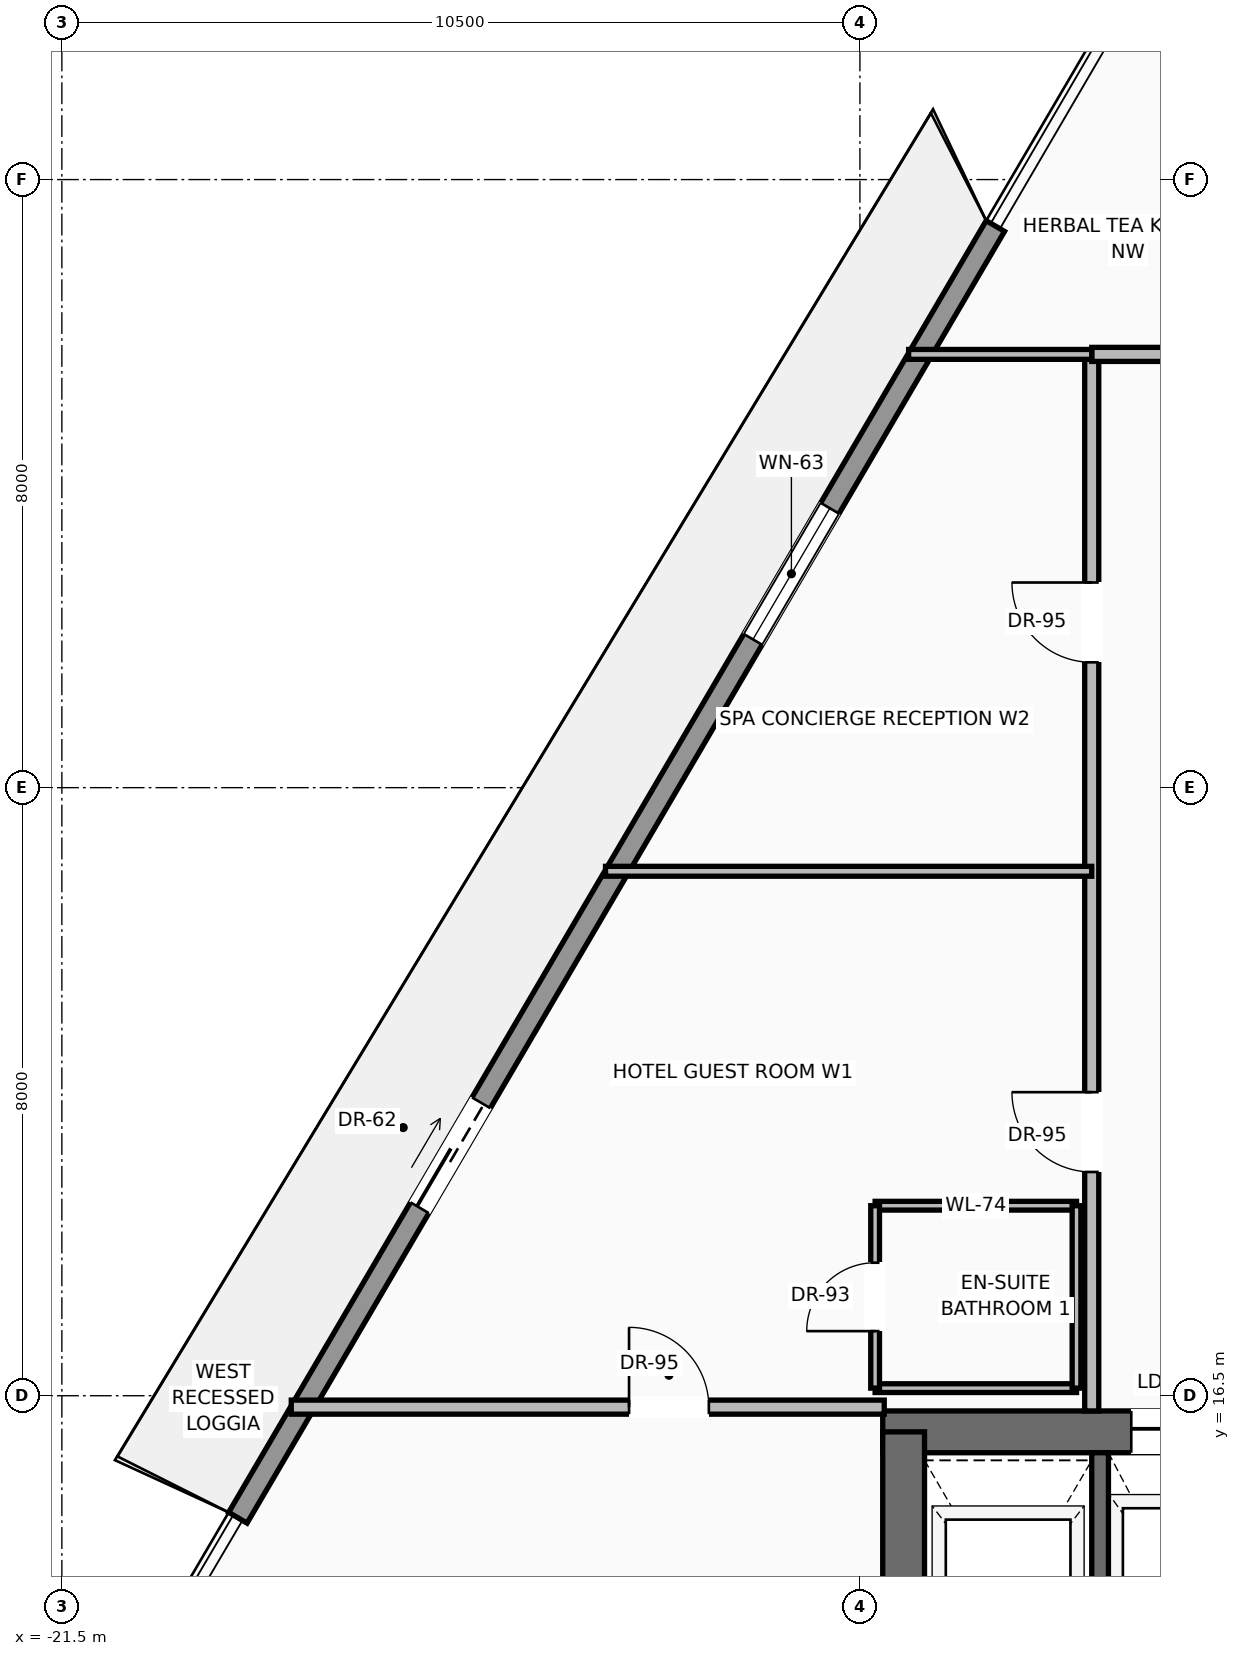
"""IFC4 building model, lengths in metres.
Left out: names, types, materials, properties, quantities, classifications, styles, units other than length and angle.
Written with IfcOpenShell. Run it as: python <this file> out.ifc"""

import sys

from ifc_helpers import new_model, si_unit, direction, frame, frame_2d, origin, place, context, subcontext, project, spatial, rectangle, extrude, source, transform, mapped, element, fill, save


model = new_model("IFC4")
c1 = context("Model", 3, precision=1e-05, world=origin(), true_north=direction((0.0, 1.0)))
c2 = subcontext(c1, "Body", "Model", "MODEL_VIEW")
j1 = project(units=[si_unit("LENGTHUNIT", "METRE"), si_unit("PLANEANGLEUNIT", "RADIAN")], contexts=[c1])
p1 = place(None, origin())
s1 = spatial("IfcSite", under=j1, at=p1, CompositionType="ELEMENT")
p2 = place(p1, origin())
s2 = spatial("IfcBuilding", under=s1, at=p2, CompositionType="ELEMENT")
p3 = place(p2, frame((0.0, 0.0, 247.6)))
s3 = spatial("IfcBuildingStorey", under=s2, at=p3, CompositionType="ELEMENT", Elevation=247.6)
p4 = place(p3, frame((-10.7, 16.025, 0.0), z_axis=(0.0, 0.0, 1.0), x_axis=(1.0, 0.0, 0.0)))
e1 = element("IfcWall", 1, at=p4, inside=s3, PredefinedType="SHEAR", context=c2, shape_type="SweptSolid", body=[
    extrude(rectangle(XDim=21.4, YDim=0.55, at=frame_2d((10.7, 0.0))), origin(), (0.0, 0.0, 1.0), 3.24),
])
p5 = place(p4, frame((3.27, 0.0, 0.0)))
e2 = element("IfcOpeningElement", 2, at=p5, cuts=e1, PredefinedType="OPENING", context=c2, shape_type="SweptSolid", body=[
    extrude(rectangle(XDim=1.3, YDim=2.3, at=frame_2d((0.65, 1.15))), frame((0.0, 0.285, 0.0), z_axis=(0.0, -1.0, 0.0), x_axis=(1.0, 0.0, 0.0)), (0.0, 0.0, 1.0), 0.57),
])
p6 = place(p4, frame((9.7, 0.0, 0.0)))
e3 = element("IfcOpeningElement", 3, at=p6, cuts=e1, PredefinedType="OPENING", context=c2, shape_type="SweptSolid", body=[
    extrude(rectangle(XDim=2.0, YDim=2.4, at=frame_2d((1.0, 1.2))), frame((0.0, 0.285, 0.0), z_axis=(0.0, -1.0, 0.0), x_axis=(1.0, 0.0, 0.0)), (0.0, 0.0, 1.0), 0.57),
])
p7 = place(p3, frame((-10.425, 0.575, 0.0), z_axis=(0.0, 0.0, 1.0), x_axis=(0.0, 1.0, 0.0)))
e4 = element("IfcWall", 4, at=p7, inside=s3, PredefinedType="SHEAR", context=c2, shape_type="SweptSolid", body=[
    extrude(rectangle(XDim=15.45, YDim=0.55, at=frame_2d((7.725, 0.0))), origin(), (0.0, 0.0, 1.0), 3.24),
])
p8 = place(p3, frame((-19.184, 14.895, 0.0), z_axis=(0.0, 0.0, 1.0), x_axis=(0.505884551296, 0.862601194504, 0.0)))
e5 = element("IfcWall", 5, at=p8, inside=s3, PredefinedType="SOLIDWALL", context=c2, shape_type="SweptSolid", body=[
    extrude(rectangle(XDim=19.701, YDim=0.28, at=frame_2d((9.85, 0.0))), origin(), (0.0, 0.0, 1.0), 2.82),
])
p9 = place(p8, frame((4.728, 0.0, 0.0)))
e6 = element("IfcOpeningElement", 6, at=p9, cuts=e5, PredefinedType="OPENING", context=c2, shape_type="SweptSolid", body=[
    extrude(rectangle(XDim=1.6, YDim=2.35, at=frame_2d((0.8, 1.175))), frame((0.0, 0.15, 0.0), z_axis=(0.0, -1.0, 0.0), x_axis=(1.0, 0.0, 0.0)), (0.0, 0.0, 1.0), 0.3),
])
p10 = place(p8, frame((13.396, 0.0, 0.9)))
e7 = element("IfcOpeningElement", 7, at=p10, cuts=e5, PredefinedType="OPENING", context=c2, shape_type="SweptSolid", body=[
    extrude(rectangle(XDim=2.0, YDim=1.75, at=frame_2d((1.0, 0.875))), frame((0.0, 0.15, 0.0), z_axis=(0.0, -1.0, 0.0), x_axis=(1.0, 0.0, 0.0)), (0.0, 0.0, 1.0), 0.3),
])
p11 = place(p3, frame((-7.84, 11.87, 0.0), z_axis=(0.0, 0.0, 1.0), x_axis=(0.0, 1.0, 0.0)))
e8 = element("IfcWall", 8, at=p11, inside=s3, PredefinedType="SOLIDWALL", context=c2, shape_type="SweptSolid", body=[
    extrude(rectangle(XDim=3.88, YDim=0.22, at=frame_2d((1.94, 0.0))), origin(), (0.0, 0.0, 1.0), 3.24),
])
p12 = place(p3, frame((-7.95, 16.3, 0.0), z_axis=(0.0, 0.0, 1.0), x_axis=(0.0, 1.0, 0.0)))
e9 = element("IfcWall", 9, at=p12, inside=s3, PredefinedType="PARTITIONING", context=c2, shape_type="SweptSolid", body=[
    extrude(rectangle(XDim=13.9, YDim=0.185, at=frame_2d((6.95, 0.0))), origin(), (0.0, 0.0, 1.0), 3.232),
])
p13 = place(p12, frame((3.144, 0.0, 0.0)))
e10 = element("IfcOpeningElement", 10, at=p13, cuts=e9, PredefinedType="OPENING", context=c2, shape_type="SweptSolid", body=[
    extrude(rectangle(XDim=1.05, YDim=2.25, at=frame_2d((0.525, 1.125))), frame((0.0, 0.103, 0.0), z_axis=(0.0, -1.0, 0.0), x_axis=(1.0, 0.0, 0.0)), (0.0, 0.0, 1.0), 0.205),
])
p14 = place(p12, frame((9.849, 0.0, 0.0)))
e11 = element("IfcOpeningElement", 11, at=p14, cuts=e9, PredefinedType="OPENING", context=c2, shape_type="SweptSolid", body=[
    extrude(rectangle(XDim=1.05, YDim=2.25, at=frame_2d((0.525, 1.125))), frame((0.0, 0.103, 0.0), z_axis=(0.0, -1.0, 0.0), x_axis=(1.0, 0.0, 0.0)), (0.0, 0.0, 1.0), 0.205),
])
p15 = place(p3, frame((-7.95, 30.2, 0.0), z_axis=(0.0, 0.0, 1.0), x_axis=(1.0, 0.0, 0.0)))
e12 = element("IfcWall", 12, at=p15, inside=s3, PredefinedType="PARTITIONING", context=c2, shape_type="SweptSolid", body=[
    extrude(rectangle(XDim=16.6, YDim=0.185, at=frame_2d((8.3, 0.0))), origin(), (0.0, 0.0, 1.0), 3.232),
])
p16 = place(p15, frame((3.25, 0.0, 0.0)))
e13 = element("IfcOpeningElement", 13, at=p16, cuts=e12, PredefinedType="OPENING", context=c2, shape_type="SweptSolid", body=[
    extrude(rectangle(XDim=1.05, YDim=2.25, at=frame_2d((0.525, 1.125))), frame((0.0, 0.103, 0.0), z_axis=(0.0, -1.0, 0.0), x_axis=(1.0, 0.0, 0.0)), (0.0, 0.0, 1.0), 0.205),
])
p17 = place(p15, frame((7.775, 0.0, 0.0)))
e14 = element("IfcOpeningElement", 14, at=p17, cuts=e12, PredefinedType="OPENING", context=c2, shape_type="SweptSolid", body=[
    extrude(rectangle(XDim=1.05, YDim=2.25, at=frame_2d((0.525, 1.125))), frame((0.0, 0.103, 0.0), z_axis=(0.0, -1.0, 0.0), x_axis=(1.0, 0.0, 0.0)), (0.0, 0.0, 1.0), 0.205),
])
p18 = place(p15, frame((11.6, 0.0, 0.0)))
e15 = element("IfcOpeningElement", 15, at=p18, cuts=e12, PredefinedType="OPENING", context=c2, shape_type="SweptSolid", body=[
    extrude(rectangle(XDim=1.05, YDim=2.25, at=frame_2d((0.525, 1.125))), frame((0.0, 0.103, 0.0), z_axis=(0.0, -1.0, 0.0), x_axis=(1.0, 0.0, 0.0)), (0.0, 0.0, 1.0), 0.205),
])
p19 = place(p3, frame((-18.482, 16.35, 0.0), z_axis=(0.0, 0.0, 1.0), x_axis=(1.0, 0.0, 0.0)))
e16 = element("IfcWall", 16, at=p19, inside=s3, PredefinedType="PARTITIONING", context=c2, shape_type="SweptSolid", body=[
    extrude(rectangle(XDim=7.802, YDim=0.185, at=frame_2d((3.901, 0.0))), origin(), (0.0, 0.0, 1.0), 3.232),
])
p20 = place(p19, frame((4.444, 0.0, 0.0)))
e17 = element("IfcOpeningElement", 17, at=p20, cuts=e16, PredefinedType="OPENING", context=c2, shape_type="SweptSolid", body=[
    extrude(rectangle(XDim=1.05, YDim=2.25, at=frame_2d((0.525, 1.125))), frame((0.0, 0.103, 0.0), z_axis=(0.0, -1.0, 0.0), x_axis=(1.0, 0.0, 0.0)), (0.0, 0.0, 1.0), 0.205),
])
p21 = place(p3, frame((-10.359, 30.2, 0.0), z_axis=(0.0, 0.0, 1.0), x_axis=(1.0, 0.0, 0.0)))
e18 = element("IfcWall", 18, at=p21, inside=s3, PredefinedType="PARTITIONING", context=c2, shape_type="SweptSolid", body=[
    extrude(rectangle(XDim=2.409, YDim=0.13, at=frame_2d((1.205, 0.0))), origin(), (0.0, 0.0, 1.0), 3.232),
])
for number, where, z_axis, x_axis in (
    (19, (-10.8, 16.6, 0.0), (0.0, 0.0, 1.0), (1.0, 0.0, 0.0)),
    (20, (-10.8, 19.0, 0.0), (0.0, 0.0, 1.0), (1.0, 0.0, 0.0)),
):
    element("IfcWall", number, at=place(p3, frame(where, z_axis=z_axis, x_axis=x_axis)), inside=s3, PredefinedType="PARTITIONING", context=c2, shape_type="SweptSolid", body=[
        extrude(rectangle(XDim=2.65, YDim=0.115, at=frame_2d((1.325, 0.0))), origin(), (0.0, 0.0, 1.0), 3.232),
    ])
p22 = place(p3, frame((-10.8, 16.6, 0.0), z_axis=(0.0, 0.0, 1.0), x_axis=(0.0, 1.0, 0.0)))
e21 = element("IfcWall", 21, at=p22, inside=s3, PredefinedType="PARTITIONING", context=c2, shape_type="SweptSolid", body=[
    extrude(rectangle(XDim=2.4, YDim=0.115, at=frame_2d((1.2, 0.0))), origin(), (0.0, 0.0, 1.0), 3.232),
])
p23 = place(p22, frame((0.75, 0.0, 0.0)))
e22 = element("IfcOpeningElement", 22, at=p23, cuts=e21, PredefinedType="OPENING", context=c2, shape_type="SweptSolid", body=[
    extrude(rectangle(XDim=0.9, YDim=2.15, at=frame_2d((0.45, 1.075))), frame((0.0, 0.067, 0.0), z_axis=(0.0, -1.0, 0.0), x_axis=(1.0, 0.0, 0.0)), (0.0, 0.0, 1.0), 0.135),
])
p24 = place(p3, frame((-8.15, 16.6, 0.0), z_axis=(0.0, 0.0, 1.0), x_axis=(0.0, 1.0, 0.0)))
e23 = element("IfcWall", 23, at=p24, inside=s3, PredefinedType="PARTITIONING", context=c2, shape_type="SweptSolid", body=[
    extrude(rectangle(XDim=2.4, YDim=0.115, at=frame_2d((1.2, 0.0))), origin(), (0.0, 0.0, 1.0), 3.232),
])
p25 = place(p3, frame((-14.347, 23.4, 0.0), z_axis=(0.0, 0.0, 1.0), x_axis=(1.0, 0.0, 0.0)))
e24 = element("IfcWall", 24, at=p25, inside=s3, PredefinedType="PARTITIONING", context=c2, shape_type="SweptSolid", body=[
    extrude(rectangle(XDim=6.397, YDim=0.13, at=frame_2d((3.199, 0.0))), origin(), (0.0, 0.0, 1.0), 3.232),
])
m1 = source(origin(), c2, "Body", "SweptSolid", [
    extrude(rectangle(XDim=1.6, YDim=2.35, at=frame_2d((0.8, 1.175))), frame((0.0, 0.025, 0.0), z_axis=(0.0, -1.0, 0.0), x_axis=(1.0, 0.0, 0.0)), (0.0, 0.0, 1.0), 0.05),
])
p26 = place(p9, origin())
e25 = element("IfcDoor", 25, at=p26, inside=s3, OperationType="SLIDING_TO_LEFT", PredefinedType="DOOR", context=c2, shape_type="MappedRepresentation", body=[
    mapped(m1, transform((0.0, 0.0, 0.0), scale=1.0)),
])
fill(e6, e25)
m2 = source(origin(), c2, "Body", "SweptSolid", [
    extrude(rectangle(XDim=2.0, YDim=1.75, at=frame_2d((1.0, 0.875))), frame((0.0, 0.03, 0.0), z_axis=(0.0, -1.0, 0.0), x_axis=(1.0, 0.0, 0.0)), (0.0, 0.0, 1.0), 0.06),
])
p27 = place(p10, origin())
e26 = element("IfcWindow", 26, at=p27, inside=s3, PartitioningType="SINGLE_PANEL", PredefinedType="WINDOW", context=c2, shape_type="MappedRepresentation", body=[
    mapped(m2, transform((0.0, 0.0, 0.0), scale=1.0)),
])
fill(e7, e26)
m3 = source(origin(), c2, "Body", "SweptSolid", [
    extrude(rectangle(XDim=1.3, YDim=2.3, at=frame_2d((0.65, 1.15))), frame((0.0, 0.025, 0.0), z_axis=(0.0, -1.0, 0.0), x_axis=(1.0, 0.0, 0.0)), (0.0, 0.0, 1.0), 0.05),
])
p28 = place(p5, origin())
e27 = element("IfcDoor", 27, at=p28, inside=s3, OperationType="SLIDING_TO_RIGHT", PredefinedType="DOOR", context=c2, shape_type="MappedRepresentation", body=[
    mapped(m3, transform((0.0, 0.0, 0.0), scale=1.0)),
])
fill(e2, e27)
m4 = source(origin(), c2, "Body", "SweptSolid", [
    extrude(rectangle(XDim=1.05, YDim=2.25, at=frame_2d((0.525, 1.125))), frame((0.0, 0.025, 0.0), z_axis=(0.0, -1.0, 0.0), x_axis=(1.0, 0.0, 0.0)), (0.0, 0.0, 1.0), 0.05),
])
p29 = place(p20, origin())
e28 = element("IfcDoor", 28, at=p29, inside=s3, OperationType="SINGLE_SWING_LEFT", PredefinedType="DOOR", context=c2, shape_type="MappedRepresentation", body=[
    mapped(m4, transform((0.0, 0.0, 0.0), scale=1.0)),
])
fill(e17, e28)
p30 = place(p13, origin())
e29 = element("IfcDoor", 29, at=p30, inside=s3, OperationType="SINGLE_SWING_RIGHT", PredefinedType="DOOR", context=c2, shape_type="MappedRepresentation", body=[
    mapped(m4, transform((0.0, 0.0, 0.0), scale=1.0)),
])
fill(e10, e29)
m5 = source(origin(), c2, "Body", "SweptSolid", [
    extrude(rectangle(XDim=0.9, YDim=2.15, at=frame_2d((0.45, 1.075))), frame((0.0, 0.025, 0.0), z_axis=(0.0, -1.0, 0.0), x_axis=(1.0, 0.0, 0.0)), (0.0, 0.0, 1.0), 0.05),
])
p31 = place(p23, origin())
e30 = element("IfcDoor", 30, at=p31, inside=s3, OperationType="SINGLE_SWING_LEFT", PredefinedType="DOOR", context=c2, shape_type="MappedRepresentation", body=[
    mapped(m5, transform((0.0, 0.0, 0.0), scale=1.0)),
])
fill(e22, e30)
p32 = place(p14, origin())
e31 = element("IfcDoor", 31, at=p32, inside=s3, OperationType="SINGLE_SWING_RIGHT", PredefinedType="DOOR", context=c2, shape_type="MappedRepresentation", body=[
    mapped(m4, transform((0.0, 0.0, 0.0), scale=1.0)),
])
fill(e11, e31)
save(model, sys.argv[1])
